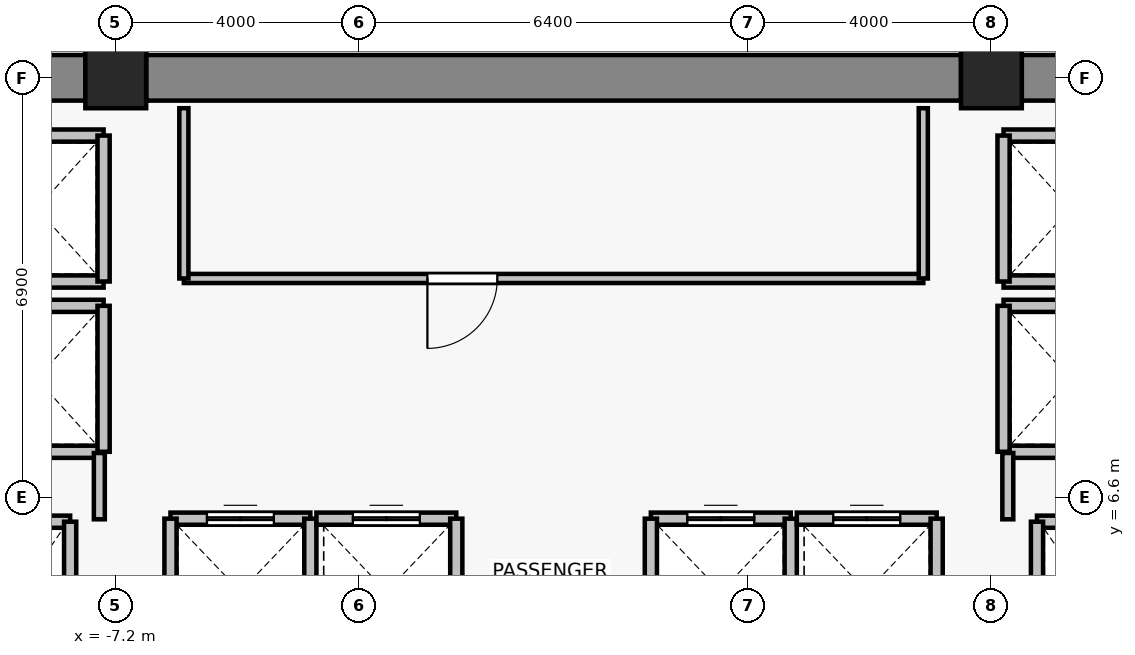
"""IFC4 building model, lengths in metres.
Left out: names, types, materials, properties, quantities, classifications, styles, units other than length and angle.
Written with IfcOpenShell. Run it as: python <this file> out.ifc"""

import sys

from ifc_helpers import new_model, si_unit, direction, frame, frame_2d, origin, origin_2d, place, context, subcontext, project, spatial, rectangle, extrude, source, transform, mapped, element, fill, save


model = new_model("IFC4")
c1 = context("Model", 3, precision=1e-05, world=origin(), true_north=direction((0.0, 1.0)))
c2 = subcontext(c1, "Body", "Model", "MODEL_VIEW")
j1 = project(units=[si_unit("LENGTHUNIT", "METRE"), si_unit("PLANEANGLEUNIT", "RADIAN")], contexts=[c1])
p1 = place(None, origin())
s1 = spatial("IfcSite", under=j1, at=p1, CompositionType="ELEMENT")
p2 = place(p1, origin())
s2 = spatial("IfcBuilding", under=s1, at=p2, CompositionType="ELEMENT")
p3 = place(p2, frame((0.0, 0.0, 146.2)))
s3 = spatial("IfcBuildingStorey", under=s2, at=p3, CompositionType="ELEMENT", Elevation=146.2)
for number, where, z_axis, x_axis in (
    (1, (-7.2, 13.5, 0.0), (0.0, 0.0, 1.0), (1.0, 0.0, 0.0)),
    (2, (7.2, 13.5, 0.0), (0.0, 0.0, 1.0), (1.0, 0.0, 0.0)),
):
    element("IfcColumn", number, at=place(p3, frame(where, z_axis=z_axis, x_axis=x_axis)), inside=s3, PredefinedType="COLUMN", context=c2, shape_type="SweptSolid", body=[
        extrude(rectangle(XDim=1.0, YDim=1.0, at=origin_2d()), origin(), (0.0, 0.0, 1.0), 3.3),
    ])
p4 = place(p3, frame((-13.9, 13.5, 0.0), z_axis=(0.0, 0.0, 1.0), x_axis=(1.0, 0.0, 0.0)))
e3 = element("IfcWall", 3, at=p4, inside=s3, PredefinedType="SHEAR", context=c2, shape_type="SweptSolid", body=[
    extrude(rectangle(XDim=6.2, YDim=0.75, at=frame_2d((3.1, 0.0))), origin(), (0.0, 0.0, 1.0), 3.075),
])
p5 = place(p3, frame((-6.7, 13.5, 0.0), z_axis=(0.0, 0.0, 1.0), x_axis=(1.0, 0.0, 0.0)))
e4 = element("IfcWall", 4, at=p5, inside=s3, PredefinedType="SHEAR", context=c2, shape_type="SweptSolid", body=[
    extrude(rectangle(XDim=13.4, YDim=0.75, at=frame_2d((6.7, 0.0))), origin(), (0.0, 0.0, 1.0), 3.075),
])
p6 = place(p3, frame((7.7, 13.5, 0.0), z_axis=(0.0, 0.0, 1.0), x_axis=(1.0, 0.0, 0.0)))
e5 = element("IfcWall", 5, at=p6, inside=s3, PredefinedType="SHEAR", context=c2, shape_type="SweptSolid", body=[
    extrude(rectangle(XDim=6.2, YDim=0.75, at=frame_2d((3.1, 0.0))), origin(), (0.0, 0.0, 1.0), 3.075),
])
p7 = place(p3, frame((-9.95, 6.2, 0.0), z_axis=(0.0, 0.0, 1.0), x_axis=(1.0, 0.0, 0.0)))
e6 = element("IfcWall", 6, at=p7, inside=s3, PredefinedType="SOLIDWALL", context=c2, shape_type="SweptSolid", body=[
    extrude(rectangle(XDim=2.0, YDim=0.2, at=frame_2d((1.0, 0.0))), origin(), (0.0, 0.0, 1.0), 3.075),
])
p8 = place(p3, frame((-7.95, 6.2, 0.0), z_axis=(0.0, 0.0, 1.0), x_axis=(0.0, -1.0, 0.0)))
e7 = element("IfcWall", 7, at=p8, inside=s3, PredefinedType="SOLIDWALL", context=c2, shape_type="SweptSolid", body=[
    extrude(rectangle(XDim=2.8, YDim=0.2, at=frame_2d((1.4, 0.0))), origin(), (0.0, 0.0, 1.0), 3.075),
])
p9 = place(p3, frame((7.95, 6.2, 0.0), z_axis=(0.0, 0.0, 1.0), x_axis=(1.0, 0.0, 0.0)))
e8 = element("IfcWall", 8, at=p9, inside=s3, PredefinedType="SOLIDWALL", context=c2, shape_type="SweptSolid", body=[
    extrude(rectangle(XDim=2.0, YDim=0.2, at=frame_2d((1.0, 0.0))), origin(), (0.0, 0.0, 1.0), 3.075),
])
p10 = place(p3, frame((7.95, 3.4, 0.0), z_axis=(0.0, 0.0, 1.0), x_axis=(0.0, 1.0, 0.0)))
e9 = element("IfcWall", 9, at=p10, inside=s3, PredefinedType="SOLIDWALL", context=c2, shape_type="SweptSolid", body=[
    extrude(rectangle(XDim=2.8, YDim=0.2, at=frame_2d((1.4, 0.0))), origin(), (0.0, 0.0, 1.0), 3.075),
])
p11 = place(p3, frame((-6.3, 6.25, 0.0), z_axis=(0.0, 0.0, 1.0), x_axis=(1.0, 0.0, 0.0)))
e10 = element("IfcWall", 10, at=p11, inside=s3, PredefinedType="SOLIDWALL", context=c2, shape_type="SweptSolid", body=[
    extrude(rectangle(XDim=2.3, YDim=0.2, at=frame_2d((1.15, 0.0))), origin(), (0.0, 0.0, 1.0), 3.075),
])
p12 = place(p11, frame((0.6, 0.0, 0.0)))
e11 = element("IfcOpeningElement", 11, at=p12, cuts=e10, PredefinedType="OPENING", context=c2, shape_type="SweptSolid", body=[
    extrude(rectangle(XDim=1.1, YDim=2.2, at=frame_2d((0.55, 1.1))), frame((0.0, 0.11, 0.0), z_axis=(0.0, -1.0, 0.0), x_axis=(1.0, 0.0, 0.0)), (0.0, 0.0, 1.0), 0.22),
])
for number, where, z_axis, x_axis in (
    (12, (-6.3, 3.85, 0.0), (0.0, 0.0, 1.0), (0.0, 1.0, 0.0)),
    (13, (-4.0, 6.25, 0.0), (0.0, 0.0, 1.0), (0.0, -1.0, 0.0)),
):
    element("IfcWall", number, at=place(p3, frame(where, z_axis=z_axis, x_axis=x_axis)), inside=s3, PredefinedType="SOLIDWALL", context=c2, shape_type="SweptSolid", body=[
        extrude(rectangle(XDim=2.4, YDim=0.2, at=frame_2d((1.2, 0.0))), origin(), (0.0, 0.0, 1.0), 3.075),
    ])
p13 = place(p3, frame((-3.9, 6.25, 0.0), z_axis=(0.0, 0.0, 1.0), x_axis=(1.0, 0.0, 0.0)))
e14 = element("IfcWall", 14, at=p13, inside=s3, PredefinedType="SOLIDWALL", context=c2, shape_type="SweptSolid", body=[
    extrude(rectangle(XDim=2.3, YDim=0.2, at=frame_2d((1.15, 0.0))), origin(), (0.0, 0.0, 1.0), 3.075),
])
p14 = place(p13, frame((0.6, 0.0, 0.0)))
e15 = element("IfcOpeningElement", 15, at=p14, cuts=e14, PredefinedType="OPENING", context=c2, shape_type="SweptSolid", body=[
    extrude(rectangle(XDim=1.1, YDim=2.2, at=frame_2d((0.55, 1.1))), frame((0.0, 0.11, 0.0), z_axis=(0.0, -1.0, 0.0), x_axis=(1.0, 0.0, 0.0)), (0.0, 0.0, 1.0), 0.22),
])
p15 = place(p3, frame((-1.6, 6.25, 0.0), z_axis=(0.0, 0.0, 1.0), x_axis=(0.0, -1.0, 0.0)))
e16 = element("IfcWall", 16, at=p15, inside=s3, PredefinedType="SOLIDWALL", context=c2, shape_type="SweptSolid", body=[
    extrude(rectangle(XDim=2.4, YDim=0.2, at=frame_2d((1.2, 0.0))), origin(), (0.0, 0.0, 1.0), 3.075),
])
p16 = place(p3, frame((1.6, 6.25, 0.0), z_axis=(0.0, 0.0, 1.0), x_axis=(1.0, 0.0, 0.0)))
e17 = element("IfcWall", 17, at=p16, inside=s3, PredefinedType="SOLIDWALL", context=c2, shape_type="SweptSolid", body=[
    extrude(rectangle(XDim=2.3, YDim=0.2, at=frame_2d((1.15, 0.0))), origin(), (0.0, 0.0, 1.0), 3.075),
])
p17 = place(p16, frame((0.6, 0.0, 0.0)))
e18 = element("IfcOpeningElement", 18, at=p17, cuts=e17, PredefinedType="OPENING", context=c2, shape_type="SweptSolid", body=[
    extrude(rectangle(XDim=1.1, YDim=2.2, at=frame_2d((0.55, 1.1))), frame((0.0, 0.11, 0.0), z_axis=(0.0, -1.0, 0.0), x_axis=(1.0, 0.0, 0.0)), (0.0, 0.0, 1.0), 0.22),
])
for number, where, z_axis, x_axis in (
    (19, (1.6, 3.85, 0.0), (0.0, 0.0, 1.0), (0.0, 1.0, 0.0)),
    (20, (3.9, 6.25, 0.0), (0.0, 0.0, 1.0), (0.0, -1.0, 0.0)),
):
    element("IfcWall", number, at=place(p3, frame(where, z_axis=z_axis, x_axis=x_axis)), inside=s3, PredefinedType="SOLIDWALL", context=c2, shape_type="SweptSolid", body=[
        extrude(rectangle(XDim=2.4, YDim=0.2, at=frame_2d((1.2, 0.0))), origin(), (0.0, 0.0, 1.0), 3.075),
    ])
p18 = place(p3, frame((4.0, 6.25, 0.0), z_axis=(0.0, 0.0, 1.0), x_axis=(1.0, 0.0, 0.0)))
e21 = element("IfcWall", 21, at=p18, inside=s3, PredefinedType="SOLIDWALL", context=c2, shape_type="SweptSolid", body=[
    extrude(rectangle(XDim=2.3, YDim=0.2, at=frame_2d((1.15, 0.0))), origin(), (0.0, 0.0, 1.0), 3.075),
])
p19 = place(p18, frame((0.6, 0.0, 0.0)))
e22 = element("IfcOpeningElement", 22, at=p19, cuts=e21, PredefinedType="OPENING", context=c2, shape_type="SweptSolid", body=[
    extrude(rectangle(XDim=1.1, YDim=2.2, at=frame_2d((0.55, 1.1))), frame((0.0, 0.11, 0.0), z_axis=(0.0, -1.0, 0.0), x_axis=(1.0, 0.0, 0.0)), (0.0, 0.0, 1.0), 0.22),
])
p20 = place(p3, frame((6.3, 6.25, 0.0), z_axis=(0.0, 0.0, 1.0), x_axis=(0.0, -1.0, 0.0)))
e23 = element("IfcWall", 23, at=p20, inside=s3, PredefinedType="SOLIDWALL", context=c2, shape_type="SweptSolid", body=[
    extrude(rectangle(XDim=2.4, YDim=0.2, at=frame_2d((1.2, 0.0))), origin(), (0.0, 0.0, 1.0), 3.075),
])
for number, where, z_axis, x_axis in (
    (24, (-7.4, 7.35, 0.0), (0.0, 0.0, 1.0), (-1.0, 0.0, 0.0)),
    (25, (-9.6, 9.75, 0.0), (0.0, 0.0, 1.0), (1.0, 0.0, 0.0)),
):
    element("IfcWall", number, at=place(p3, frame(where, z_axis=z_axis, x_axis=x_axis)), inside=s3, PredefinedType="SOLIDWALL", context=c2, shape_type="SweptSolid", body=[
        extrude(rectangle(XDim=2.2, YDim=0.2, at=frame_2d((1.1, 0.0))), origin(), (0.0, 0.0, 1.0), 2.565),
    ])
p21 = place(p3, frame((-7.4, 9.75, 0.0), z_axis=(0.0, 0.0, 1.0), x_axis=(0.0, -1.0, 0.0)))
e26 = element("IfcWall", 26, at=p21, inside=s3, PredefinedType="SOLIDWALL", context=c2, shape_type="SweptSolid", body=[
    extrude(rectangle(XDim=2.4, YDim=0.2, at=frame_2d((1.2, 0.0))), origin(), (0.0, 0.0, 1.0), 2.565),
])
for number, where, z_axis, x_axis in (
    (27, (-7.4, 10.15, 0.0), (0.0, 0.0, 1.0), (-1.0, 0.0, 0.0)),
    (28, (-9.6, 12.55, 0.0), (0.0, 0.0, 1.0), (1.0, 0.0, 0.0)),
):
    element("IfcWall", number, at=place(p3, frame(where, z_axis=z_axis, x_axis=x_axis)), inside=s3, PredefinedType="SOLIDWALL", context=c2, shape_type="SweptSolid", body=[
        extrude(rectangle(XDim=2.2, YDim=0.2, at=frame_2d((1.1, 0.0))), origin(), (0.0, 0.0, 1.0), 2.565),
    ])
p22 = place(p3, frame((-7.4, 12.55, 0.0), z_axis=(0.0, 0.0, 1.0), x_axis=(0.0, -1.0, 0.0)))
e29 = element("IfcWall", 29, at=p22, inside=s3, PredefinedType="SOLIDWALL", context=c2, shape_type="SweptSolid", body=[
    extrude(rectangle(XDim=2.4, YDim=0.2, at=frame_2d((1.2, 0.0))), origin(), (0.0, 0.0, 1.0), 2.565),
])
for number, where, z_axis, x_axis in (
    (30, (9.6, 7.35, 0.0), (0.0, 0.0, 1.0), (-1.0, 0.0, 0.0)),
    (31, (7.4, 9.75, 0.0), (0.0, 0.0, 1.0), (1.0, 0.0, 0.0)),
):
    element("IfcWall", number, at=place(p3, frame(where, z_axis=z_axis, x_axis=x_axis)), inside=s3, PredefinedType="SOLIDWALL", context=c2, shape_type="SweptSolid", body=[
        extrude(rectangle(XDim=2.2, YDim=0.2, at=frame_2d((1.1, 0.0))), origin(), (0.0, 0.0, 1.0), 2.565),
    ])
p23 = place(p3, frame((7.4, 7.35, 0.0), z_axis=(0.0, 0.0, 1.0), x_axis=(0.0, 1.0, 0.0)))
e32 = element("IfcWall", 32, at=p23, inside=s3, PredefinedType="SOLIDWALL", context=c2, shape_type="SweptSolid", body=[
    extrude(rectangle(XDim=2.4, YDim=0.2, at=frame_2d((1.2, 0.0))), origin(), (0.0, 0.0, 1.0), 2.565),
])
for number, where, z_axis, x_axis in (
    (33, (9.6, 10.15, 0.0), (0.0, 0.0, 1.0), (-1.0, 0.0, 0.0)),
    (34, (7.4, 12.55, 0.0), (0.0, 0.0, 1.0), (1.0, 0.0, 0.0)),
):
    element("IfcWall", number, at=place(p3, frame(where, z_axis=z_axis, x_axis=x_axis)), inside=s3, PredefinedType="SOLIDWALL", context=c2, shape_type="SweptSolid", body=[
        extrude(rectangle(XDim=2.2, YDim=0.2, at=frame_2d((1.1, 0.0))), origin(), (0.0, 0.0, 1.0), 2.565),
    ])
p24 = place(p3, frame((7.4, 10.15, 0.0), z_axis=(0.0, 0.0, 1.0), x_axis=(0.0, 1.0, 0.0)))
e35 = element("IfcWall", 35, at=p24, inside=s3, PredefinedType="SOLIDWALL", context=c2, shape_type="SweptSolid", body=[
    extrude(rectangle(XDim=2.4, YDim=0.2, at=frame_2d((1.2, 0.0))), origin(), (0.0, 0.0, 1.0), 2.565),
])
for number, where, z_axis, x_axis in (
    (36, (-7.47, 7.33, 0.0), (0.0, 0.0, 1.0), (0.0, -1.0, 0.0)),
    (37, (7.47, 6.24, 0.0), (0.0, 0.0, 1.0), (0.0, 1.0, 0.0)),
):
    element("IfcWall", number, at=place(p3, frame(where, z_axis=z_axis, x_axis=x_axis)), inside=s3, PredefinedType="PARTITIONING", context=c2, shape_type="SweptSolid", body=[
        extrude(rectangle(XDim=1.09, YDim=0.18, at=frame_2d((0.545, 0.0))), origin(), (0.0, 0.0, 1.0), 2.565),
    ])
p25 = place(p3, frame((6.08, 10.2, 0.0), z_axis=(0.0, 0.0, 1.0), x_axis=(-1.0, 0.0, 0.0)))
e38 = element("IfcWall", 38, at=p25, inside=s3, PredefinedType="PARTITIONING", context=c2, shape_type="SweptSolid", body=[
    extrude(rectangle(XDim=12.16, YDim=0.15, at=frame_2d((6.08, 0.0))), origin(), (0.0, 0.0, 1.0), 3.075),
])
p26 = place(p25, frame((7.005, 0.0, 0.0)))
e39 = element("IfcOpeningElement", 39, at=p26, cuts=e38, PredefinedType="OPENING", context=c2, shape_type="SweptSolid", body=[
    extrude(rectangle(XDim=1.15, YDim=2.15, at=frame_2d((0.575, 1.075))), frame((0.0, 0.085, 0.0), z_axis=(0.0, -1.0, 0.0), x_axis=(1.0, 0.0, 0.0)), (0.0, 0.0, 1.0), 0.17),
])
for number, where, z_axis, x_axis in (
    (40, (-6.08, 10.2, 0.0), (0.0, 0.0, 1.0), (0.0, 1.0, 0.0)),
    (41, (6.08, 13.0, 0.0), (0.0, 0.0, 1.0), (0.0, -1.0, 0.0)),
):
    element("IfcWall", number, at=place(p3, frame(where, z_axis=z_axis, x_axis=x_axis)), inside=s3, PredefinedType="PARTITIONING", context=c2, shape_type="SweptSolid", body=[
        extrude(rectangle(XDim=2.8, YDim=0.15, at=frame_2d((1.4, 0.0))), origin(), (0.0, 0.0, 1.0), 3.075),
    ])
m1 = source(origin(), c2, "Body", "SweptSolid", [
    extrude(rectangle(XDim=1.1, YDim=2.2, at=frame_2d((0.55, 1.1))), frame((0.0, 0.025, 0.0), z_axis=(0.0, -1.0, 0.0), x_axis=(1.0, 0.0, 0.0)), (0.0, 0.0, 1.0), 0.05),
])
p27 = place(p12, origin())
e42 = element("IfcDoor", 42, at=p27, inside=s3, OperationType="DOUBLE_DOOR_SLIDING", PredefinedType="DOOR", context=c2, shape_type="MappedRepresentation", body=[
    mapped(m1, transform((0.0, 0.0, 0.0), x_axis=(1.0, 0.0, 0.0), y_axis=(0.0, 1.0, 0.0), z_axis=(0.0, 0.0, 1.0), scale=1.0)),
])
fill(e11, e42)
p28 = place(p14, origin())
e43 = element("IfcDoor", 43, at=p28, inside=s3, OperationType="DOUBLE_DOOR_SLIDING", PredefinedType="DOOR", context=c2, shape_type="MappedRepresentation", body=[
    mapped(m1, transform((0.0, 0.0, 0.0), x_axis=(1.0, 0.0, 0.0), y_axis=(0.0, 1.0, 0.0), z_axis=(0.0, 0.0, 1.0), scale=1.0)),
])
fill(e15, e43)
p29 = place(p17, origin())
e44 = element("IfcDoor", 44, at=p29, inside=s3, OperationType="DOUBLE_DOOR_SLIDING", PredefinedType="DOOR", context=c2, shape_type="MappedRepresentation", body=[
    mapped(m1, transform((0.0, 0.0, 0.0), x_axis=(1.0, 0.0, 0.0), y_axis=(0.0, 1.0, 0.0), z_axis=(0.0, 0.0, 1.0), scale=1.0)),
])
fill(e18, e44)
p30 = place(p19, origin())
e45 = element("IfcDoor", 45, at=p30, inside=s3, OperationType="DOUBLE_DOOR_SLIDING", PredefinedType="DOOR", context=c2, shape_type="MappedRepresentation", body=[
    mapped(m1, transform((0.0, 0.0, 0.0), x_axis=(1.0, 0.0, 0.0), y_axis=(0.0, 1.0, 0.0), z_axis=(0.0, 0.0, 1.0), scale=1.0)),
])
fill(e22, e45)
m2 = source(origin(), c2, "Body", "SweptSolid", [
    extrude(rectangle(XDim=1.15, YDim=2.15, at=frame_2d((0.575, 1.075))), frame((0.0, 0.025, 0.0), z_axis=(0.0, -1.0, 0.0), x_axis=(1.0, 0.0, 0.0)), (0.0, 0.0, 1.0), 0.05),
])
p31 = place(p26, origin())
e46 = element("IfcDoor", 46, at=p31, inside=s3, OperationType="SINGLE_SWING_RIGHT", PredefinedType="DOOR", context=c2, shape_type="MappedRepresentation", body=[
    mapped(m2, transform((0.0, 0.0, 0.0), x_axis=(1.0, 0.0, 0.0), y_axis=(0.0, 1.0, 0.0), z_axis=(0.0, 0.0, 1.0), scale=1.0)),
])
fill(e39, e46)
save(model, sys.argv[1])
